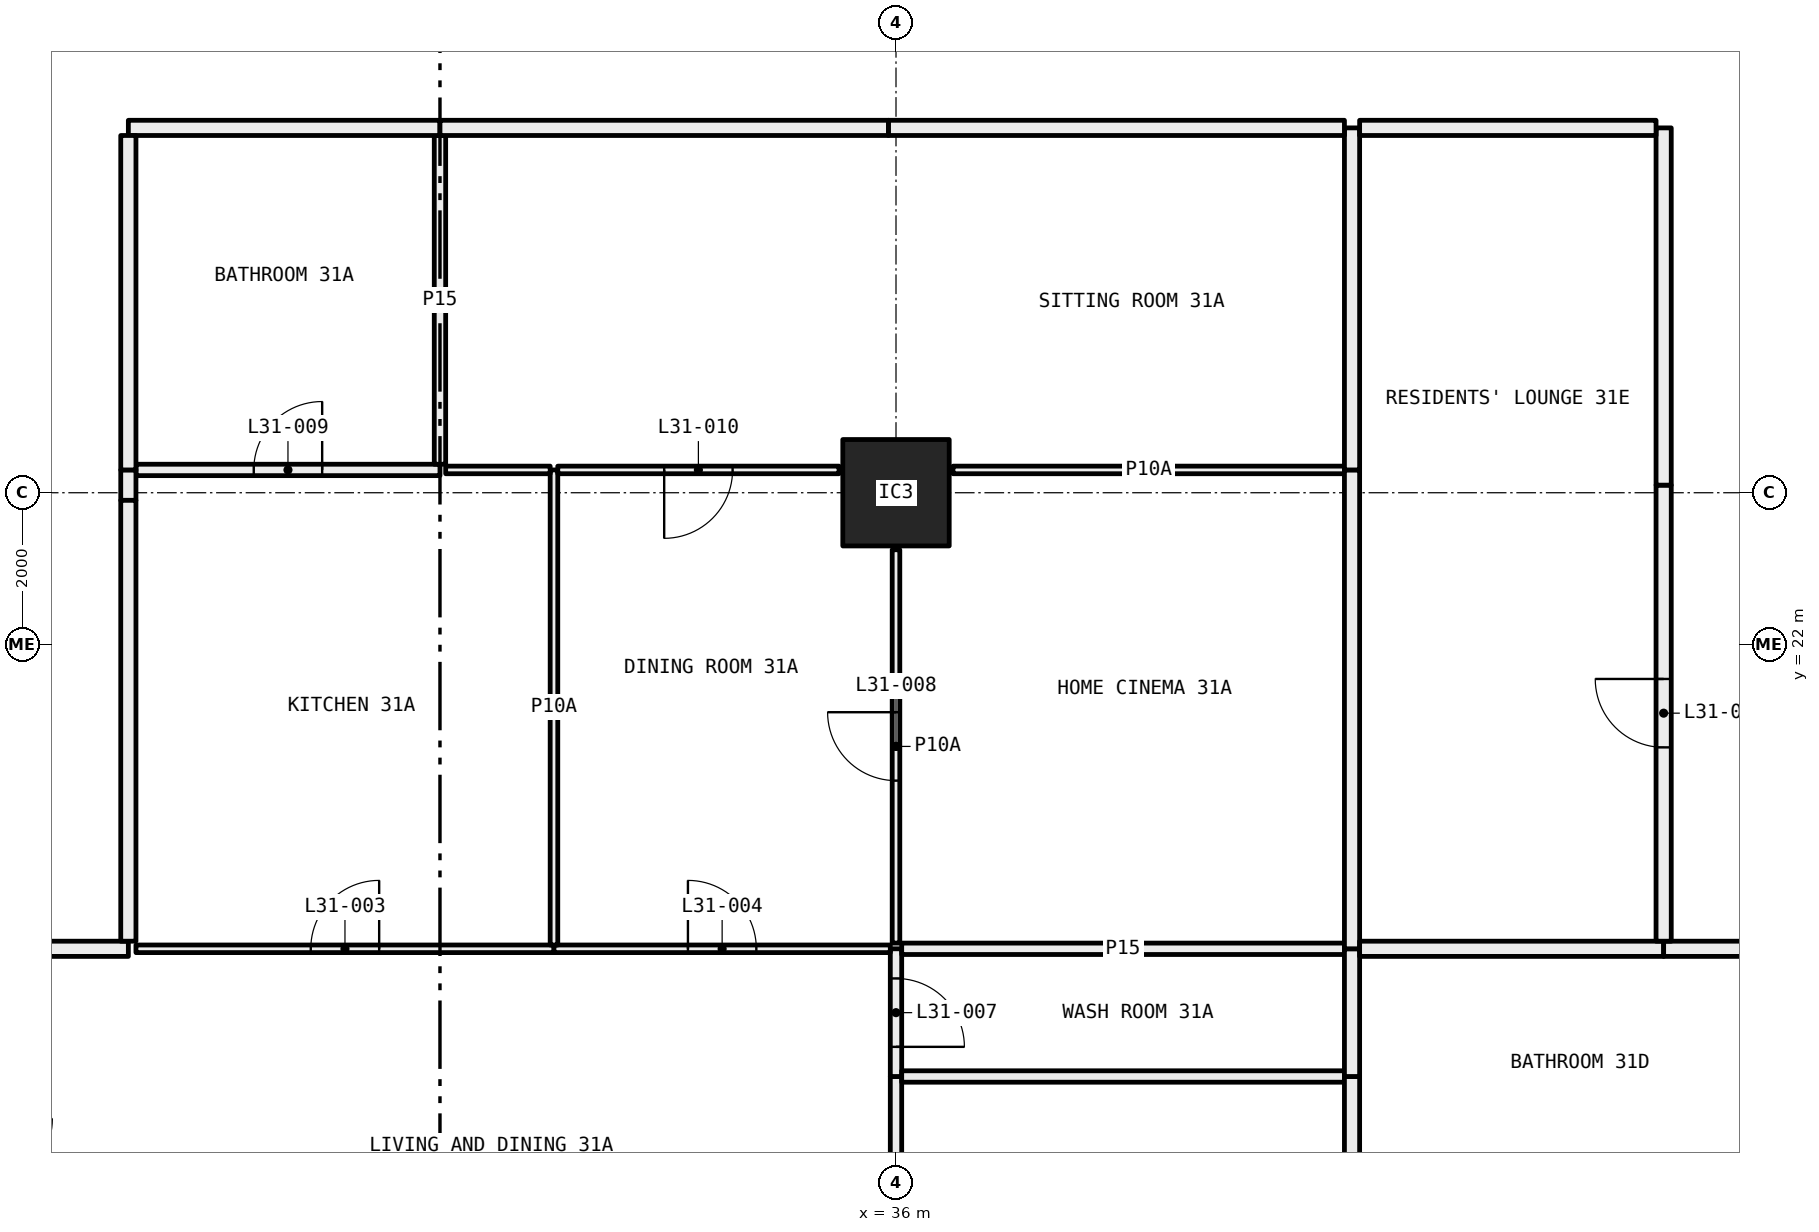
"""IFC4 building model, lengths in metres.
Left out: names, types, materials, properties, quantities, classifications, styles, units other than length and angle.
Written with IfcOpenShell. Run it as: python <this file> out.ifc"""

import sys

from ifc_helpers import new_model, si_unit, direction, frame, frame_2d, origin, origin_2d, place, context, subcontext, project, spatial, rectangle, hollow_rectangle, extrude, element, fill, save


model = new_model("IFC4")
c1 = context("Model", 3, precision=1e-05, world=origin(), true_north=direction((0.0, 1.0)))
c2 = subcontext(c1, "Body", "Model", "MODEL_VIEW")
j1 = project(units=[si_unit("LENGTHUNIT", "METRE"), si_unit("PLANEANGLEUNIT", "RADIAN")], contexts=[c1])
p1 = place(None, origin())
s1 = spatial("IfcSite", under=j1, at=p1, CompositionType="ELEMENT")
p2 = place(p1, origin())
s2 = spatial("IfcBuilding", under=s1, at=p2, CompositionType="ELEMENT")
p3 = place(p2, frame((0.0, 0.0, 120.75)))
s3 = spatial("IfcBuildingStorey", under=s2, at=p3, CompositionType="ELEMENT", Elevation=120.75)
p4 = place(p3, frame((36.0, 24.0, 0.0), z_axis=(0.0, 0.0, 1.0), x_axis=(1.0, 0.0, 0.0)))
e1 = element("IfcColumn", 1, at=p4, inside=s3, PredefinedType="COLUMN", context=c2, shape_type="SweptSolid", body=[
    extrude(hollow_rectangle(XDim=1.4, YDim=1.4, WallThickness=0.06, at=origin_2d()), origin(), (0.0, 0.0, 1.0), 3.05),
])
p5 = place(p3, frame((36.0, 12.72, 0.0), z_axis=(0.0, 0.0, 1.0), x_axis=(0.0, 1.0, 0.0)))
e2 = element("IfcWall", 2, at=p5, inside=s3, PredefinedType="PARTITIONING", context=c2, shape_type="SweptSolid", body=[
    extrude(rectangle(XDim=3.6, YDim=0.15, at=frame_2d((1.8, 0.0))), origin(), (0.0, 0.0, 1.0), 2.45),
])
p6 = place(p5, frame((1.35, 0.0, 0.0)))
e3 = element("IfcOpeningElement", 3, at=p6, cuts=e2, PredefinedType="OPENING", context=c2, shape_type="SweptSolid", body=[
    extrude(rectangle(XDim=0.9, YDim=2.1, at=frame_2d((0.45, 1.05))), frame((0.0, 0.085, 0.0), z_axis=(0.0, -1.0, 0.0), x_axis=(1.0, 0.0, 0.0)), (0.0, 0.0, 1.0), 0.17),
])
p7 = place(p3, frame((36.0, 16.32, 0.0), z_axis=(0.0, 0.0, 1.0), x_axis=(0.0, 1.0, 0.0)))
e4 = element("IfcWall", 4, at=p7, inside=s3, PredefinedType="PARTITIONING", context=c2, shape_type="SweptSolid", body=[
    extrude(rectangle(XDim=1.68, YDim=0.15, at=frame_2d((0.84, 0.0))), origin(), (0.0, 0.0, 1.0), 2.45),
])
p8 = place(p7, frame((0.39, 0.0, 0.0)))
e5 = element("IfcOpeningElement", 5, at=p8, cuts=e4, PredefinedType="OPENING", context=c2, shape_type="SweptSolid", body=[
    extrude(rectangle(XDim=0.9, YDim=2.1, at=frame_2d((0.45, 1.05))), frame((0.0, 0.085, 0.0), z_axis=(0.0, -1.0, 0.0), x_axis=(1.0, 0.0, 0.0)), (0.0, 0.0, 1.0), 0.17),
])
p9 = place(p3, frame((31.5, 18.0, 0.0), z_axis=(0.0, 0.0, 1.0), x_axis=(-1.0, 0.0, 0.0)))
e6 = element("IfcWall", 6, at=p9, inside=s3, PredefinedType="PARTITIONING", context=c2, shape_type="SweptSolid", body=[
    extrude(rectangle(XDim=5.5, YDim=0.1, at=frame_2d((2.75, 0.0))), origin(), (0.0, 0.0, 1.0), 3.05),
])
p10 = place(p9, frame((2.3, 0.0, 0.0)))
e7 = element("IfcOpeningElement", 7, at=p10, cuts=e6, PredefinedType="OPENING", context=c2, shape_type="SweptSolid", body=[
    extrude(rectangle(XDim=0.9, YDim=2.1, at=frame_2d((0.45, 1.05))), frame((0.0, 0.06, 0.0), z_axis=(0.0, -1.0, 0.0), x_axis=(1.0, 0.0, 0.0)), (0.0, 0.0, 1.0), 0.12),
])
p11 = place(p3, frame((35.925, 18.0, 0.0), z_axis=(0.0, 0.0, 1.0), x_axis=(-1.0, 0.0, 0.0)))
e8 = element("IfcWall", 8, at=p11, inside=s3, PredefinedType="PARTITIONING", context=c2, shape_type="SweptSolid", body=[
    extrude(rectangle(XDim=4.425, YDim=0.1, at=frame_2d((2.212, 0.0))), origin(), (0.0, 0.0, 1.0), 2.45),
])
p12 = place(p11, frame((1.762, 0.0, 0.0)))
e9 = element("IfcOpeningElement", 9, at=p12, cuts=e8, PredefinedType="OPENING", context=c2, shape_type="SweptSolid", body=[
    extrude(rectangle(XDim=0.9, YDim=2.1, at=frame_2d((0.45, 1.05))), frame((0.0, 0.06, 0.0), z_axis=(0.0, -1.0, 0.0), x_axis=(1.0, 0.0, 0.0)), (0.0, 0.0, 1.0), 0.12),
])
p13 = place(p3, frame((25.9, 18.0, 0.0), z_axis=(0.0, 0.0, 1.0), x_axis=(-1.0, 0.0, 0.0)))
e10 = element("IfcWall", 10, at=p13, inside=s3, PredefinedType="PARTITIONING", context=c2, shape_type="SweptSolid", body=[
    extrude(rectangle(XDim=1.9, YDim=0.2, at=frame_2d((0.95, 0.0))), origin(), (0.0, 0.0, 1.0), 3.05),
])
p14 = place(p3, frame((41.9, 16.32, 0.0), z_axis=(0.0, 0.0, 1.0), x_axis=(-1.0, 0.0, 0.0)))
e11 = element("IfcWall", 11, at=p14, inside=s3, PredefinedType="PARTITIONING", context=c2, shape_type="SweptSolid", body=[
    extrude(rectangle(XDim=5.825, YDim=0.15, at=frame_2d((2.913, 0.0))), origin(), (0.0, 0.0, 1.0), 2.45),
])
p15 = place(p3, frame((42.0, 15.0, 0.0), z_axis=(0.0, 0.0, 1.0), x_axis=(0.0, 1.0, 0.0)))
e12 = element("IfcWall", 12, at=p15, inside=s3, PredefinedType="PARTITIONING", context=c2, shape_type="SweptSolid", body=[
    extrude(rectangle(XDim=1.32, YDim=0.2, at=frame_2d((0.66, 0.0))), origin(), (0.0, 0.0, 1.0), 3.05),
])
p16 = place(p3, frame((41.9, 18.0, 0.0), z_axis=(0.0, 0.0, 1.0), x_axis=(-1.0, 0.0, 0.0)))
e13 = element("IfcWall", 13, at=p16, inside=s3, PredefinedType="PARTITIONING", context=c2, shape_type="SweptSolid", body=[
    extrude(rectangle(XDim=5.825, YDim=0.15, at=frame_2d((2.913, 0.0))), origin(), (0.0, 0.0, 1.0), 2.45),
])
p17 = place(p3, frame((42.0, 16.32, 0.0), z_axis=(0.0, 0.0, 1.0), x_axis=(0.0, 1.0, 0.0)))
e14 = element("IfcWall", 14, at=p17, inside=s3, PredefinedType="PARTITIONING", context=c2, shape_type="SweptSolid", body=[
    extrude(rectangle(XDim=1.68, YDim=0.2, at=frame_2d((0.84, 0.0))), origin(), (0.0, 0.0, 1.0), 3.05),
])
p18 = place(p3, frame((31.5, 18.05, 0.0), z_axis=(0.0, 0.0, 1.0), x_axis=(0.0, 1.0, 0.0)))
e15 = element("IfcWall", 15, at=p18, inside=s3, PredefinedType="PARTITIONING", context=c2, shape_type="SweptSolid", body=[
    extrude(rectangle(XDim=6.25, YDim=0.1, at=frame_2d((3.125, 0.0))), origin(), (0.0, 0.0, 1.0), 2.45),
])
p19 = place(p3, frame((30.0, 24.3, 0.0), z_axis=(0.0, 0.0, 1.0), x_axis=(-1.0, 0.0, 0.0)))
e16 = element("IfcWall", 16, at=p19, inside=s3, PredefinedType="PARTITIONING", context=c2, shape_type="SweptSolid", body=[
    extrude(rectangle(XDim=4.0, YDim=0.15, at=frame_2d((2.0, 0.0))), origin(), (0.0, 0.0, 1.0), 3.05),
])
p20 = place(p19, frame((1.55, 0.0, 0.0)))
e17 = element("IfcOpeningElement", 17, at=p20, cuts=e16, PredefinedType="OPENING", context=c2, shape_type="SweptSolid", body=[
    extrude(rectangle(XDim=0.9, YDim=2.1, at=frame_2d((0.45, 1.05))), frame((0.0, 0.085, 0.0), z_axis=(0.0, -1.0, 0.0), x_axis=(1.0, 0.0, 0.0)), (0.0, 0.0, 1.0), 0.17),
])
p21 = place(p3, frame((31.45, 24.3, 0.0), z_axis=(0.0, 0.0, 1.0), x_axis=(-1.0, 0.0, 0.0)))
e18 = element("IfcWall", 18, at=p21, inside=s3, PredefinedType="PARTITIONING", context=c2, shape_type="SweptSolid", body=[
    extrude(rectangle(XDim=1.375, YDim=0.1, at=frame_2d((0.688, 0.0))), origin(), (0.0, 0.0, 1.0), 3.05),
])
p22 = place(p3, frame((25.9, 24.3, 0.0), z_axis=(0.0, 0.0, 1.0), x_axis=(0.0, -1.0, 0.0)))
e19 = element("IfcWall", 19, at=p22, inside=s3, PredefinedType="PARTITIONING", context=c2, shape_type="SweptSolid", body=[
    extrude(rectangle(XDim=0.4, YDim=0.2, at=frame_2d((0.2, 0.0))), origin(), (0.0, 0.0, 1.0), 2.45),
])
p23 = place(p3, frame((25.9, 23.9, 0.0), z_axis=(0.0, 0.0, 1.0), x_axis=(0.0, -1.0, 0.0)))
e20 = element("IfcWall", 20, at=p23, inside=s3, PredefinedType="PARTITIONING", context=c2, shape_type="SweptSolid", body=[
    extrude(rectangle(XDim=5.8, YDim=0.2, at=frame_2d((2.9, 0.0))), origin(), (0.0, 0.0, 1.0), 3.05),
])
p24 = place(p3, frame((36.0, 18.075, 0.0), z_axis=(0.0, 0.0, 1.0), x_axis=(0.0, 1.0, 0.0)))
e21 = element("IfcWall", 21, at=p24, inside=s3, PredefinedType="PARTITIONING", context=c2, shape_type="SweptSolid", body=[
    extrude(rectangle(XDim=5.175, YDim=0.1, at=frame_2d((2.587, 0.0))), origin(), (0.0, 0.0, 1.0), 2.45),
])
p25 = place(p24, frame((2.137, 0.0, 0.0)))
e22 = element("IfcOpeningElement", 22, at=p25, cuts=e21, PredefinedType="OPENING", context=c2, shape_type="SweptSolid", body=[
    extrude(rectangle(XDim=0.9, YDim=2.1, at=frame_2d((0.45, 1.05))), frame((0.0, 0.06, 0.0), z_axis=(0.0, -1.0, 0.0), x_axis=(1.0, 0.0, 0.0)), (0.0, 0.0, 1.0), 0.12),
])
p26 = place(p3, frame((35.25, 24.3, 0.0), z_axis=(0.0, 0.0, 1.0), x_axis=(-1.0, 0.0, 0.0)))
e23 = element("IfcWall", 23, at=p26, inside=s3, PredefinedType="PARTITIONING", context=c2, shape_type="SweptSolid", body=[
    extrude(rectangle(XDim=3.7, YDim=0.1, at=frame_2d((1.85, 0.0))), origin(), (0.0, 0.0, 1.0), 3.05),
])
p27 = place(p26, frame((1.4, 0.0, 0.0)))
e24 = element("IfcOpeningElement", 24, at=p27, cuts=e23, PredefinedType="OPENING", context=c2, shape_type="SweptSolid", body=[
    extrude(rectangle(XDim=0.9, YDim=2.1, at=frame_2d((0.45, 1.05))), frame((0.0, 0.06, 0.0), z_axis=(0.0, -1.0, 0.0), x_axis=(1.0, 0.0, 0.0)), (0.0, 0.0, 1.0), 0.12),
])
p28 = place(p3, frame((41.9, 24.3, 0.0), z_axis=(0.0, 0.0, 1.0), x_axis=(-1.0, 0.0, 0.0)))
e25 = element("IfcWall", 25, at=p28, inside=s3, PredefinedType="PARTITIONING", context=c2, shape_type="SweptSolid", body=[
    extrude(rectangle(XDim=5.15, YDim=0.1, at=frame_2d((2.575, 0.0))), origin(), (0.0, 0.0, 1.0), 3.05),
])
p29 = place(p3, frame((42.0, 18.0, 0.0), z_axis=(0.0, 0.0, 1.0), x_axis=(0.0, 1.0, 0.0)))
e26 = element("IfcWall", 26, at=p29, inside=s3, PredefinedType="PARTITIONING", context=c2, shape_type="SweptSolid", body=[
    extrude(rectangle(XDim=6.3, YDim=0.2, at=frame_2d((3.15, 0.0))), origin(), (0.0, 0.0, 1.0), 2.45),
])
p30 = place(p3, frame((30.0, 24.375, 0.0), z_axis=(0.0, 0.0, 1.0), x_axis=(0.0, 1.0, 0.0)))
e27 = element("IfcWall", 27, at=p30, inside=s3, PredefinedType="PARTITIONING", context=c2, shape_type="SweptSolid", body=[
    extrude(rectangle(XDim=4.325, YDim=0.15, at=frame_2d((2.163, 0.0))), origin(), (0.0, 0.0, 1.0), 3.05),
])
p31 = place(p3, frame((30.0, 28.8, 0.0), z_axis=(0.0, 0.0, 1.0), x_axis=(-1.0, 0.0, 0.0)))
e28 = element("IfcWall", 28, at=p31, inside=s3, PredefinedType="PARTITIONING", context=c2, shape_type="SweptSolid", body=[
    extrude(rectangle(XDim=4.1, YDim=0.2, at=frame_2d((2.05, 0.0))), origin(), (0.0, 0.0, 1.0), 3.05),
])
p32 = place(p3, frame((25.9, 28.7, 0.0), z_axis=(0.0, 0.0, 1.0), x_axis=(0.0, -1.0, 0.0)))
e29 = element("IfcWall", 29, at=p32, inside=s3, PredefinedType="PARTITIONING", context=c2, shape_type="SweptSolid", body=[
    extrude(rectangle(XDim=4.4, YDim=0.2, at=frame_2d((2.2, 0.0))), origin(), (0.0, 0.0, 1.0), 3.05),
])
p33 = place(p3, frame((42.0, 24.3, 0.0), z_axis=(0.0, 0.0, 1.0), x_axis=(0.0, 1.0, 0.0)))
e30 = element("IfcWall", 30, at=p33, inside=s3, PredefinedType="PARTITIONING", context=c2, shape_type="SweptSolid", body=[
    extrude(rectangle(XDim=4.5, YDim=0.2, at=frame_2d((2.25, 0.0))), origin(), (0.0, 0.0, 1.0), 3.05),
])
p34 = place(p3, frame((41.9, 28.8, 0.0), z_axis=(0.0, 0.0, 1.0), x_axis=(-1.0, 0.0, 0.0)))
e31 = element("IfcWall", 31, at=p34, inside=s3, PredefinedType="PARTITIONING", context=c2, shape_type="SweptSolid", body=[
    extrude(rectangle(XDim=6.0, YDim=0.2, at=frame_2d((3.0, 0.0))), origin(), (0.0, 0.0, 1.0), 2.45),
])
p35 = place(p3, frame((35.9, 28.8, 0.0), z_axis=(0.0, 0.0, 1.0), x_axis=(-1.0, 0.0, 0.0)))
e32 = element("IfcWall", 32, at=p35, inside=s3, PredefinedType="PARTITIONING", context=c2, shape_type="SweptSolid", body=[
    extrude(rectangle(XDim=5.9, YDim=0.2, at=frame_2d((2.95, 0.0))), origin(), (0.0, 0.0, 1.0), 3.05),
])
p36 = place(p3, frame((46.1, 18.0, 0.0), z_axis=(0.0, 0.0, 1.0), x_axis=(-1.0, 0.0, 0.0)))
e33 = element("IfcWall", 33, at=p36, inside=s3, PredefinedType="PARTITIONING", context=c2, shape_type="SweptSolid", body=[
    extrude(rectangle(XDim=4.0, YDim=0.2, at=frame_2d((2.0, 0.0))), origin(), (0.0, 0.0, 1.0), 3.05),
])
p37 = place(p3, frame((48.0, 18.0, 0.0), z_axis=(0.0, 0.0, 1.0), x_axis=(-1.0, 0.0, 0.0)))
e34 = element("IfcWall", 34, at=p37, inside=s3, PredefinedType="PARTITIONING", context=c2, shape_type="SweptSolid", body=[
    extrude(rectangle(XDim=1.9, YDim=0.2, at=frame_2d((0.95, 0.0))), origin(), (0.0, 0.0, 1.0), 3.05),
])
p38 = place(p3, frame((46.1, 18.1, 0.0), z_axis=(0.0, 0.0, 1.0), x_axis=(0.0, 1.0, 0.0)))
e35 = element("IfcWall", 35, at=p38, inside=s3, PredefinedType="PARTITIONING", context=c2, shape_type="SweptSolid", body=[
    extrude(rectangle(XDim=6.0, YDim=0.2, at=frame_2d((3.0, 0.0))), origin(), (0.0, 0.0, 1.0), 2.45),
])
p39 = place(p38, frame((2.55, 0.0, 0.0)))
e36 = element("IfcOpeningElement", 36, at=p39, cuts=e35, PredefinedType="OPENING", context=c2, shape_type="SweptSolid", body=[
    extrude(rectangle(XDim=0.9, YDim=2.1, at=frame_2d((0.45, 1.05))), frame((0.0, 0.11, 0.0), z_axis=(0.0, -1.0, 0.0), x_axis=(1.0, 0.0, 0.0)), (0.0, 0.0, 1.0), 0.22),
])
p40 = place(p3, frame((46.1, 24.1, 0.0), z_axis=(0.0, 0.0, 1.0), x_axis=(0.0, 1.0, 0.0)))
e37 = element("IfcWall", 37, at=p40, inside=s3, PredefinedType="PARTITIONING", context=c2, shape_type="SweptSolid", body=[
    extrude(rectangle(XDim=4.7, YDim=0.2, at=frame_2d((2.35, 0.0))), origin(), (0.0, 0.0, 1.0), 3.05),
])
p41 = place(p3, frame((46.0, 28.8, 0.0), z_axis=(0.0, 0.0, 1.0), x_axis=(-1.0, 0.0, 0.0)))
e38 = element("IfcWall", 38, at=p41, inside=s3, PredefinedType="PARTITIONING", context=c2, shape_type="SweptSolid", body=[
    extrude(rectangle(XDim=3.9, YDim=0.2, at=frame_2d((1.95, 0.0))), origin(), (0.0, 0.0, 1.0), 3.05),
])
p42 = place(p10, frame((0.9, 0.0, 0.0), x_axis=(-1.0, 0.0, 0.0)))
e39 = element("IfcDoor", 39, at=p42, inside=s3, OperationType="SINGLE_SWING_LEFT", PredefinedType="DOOR", context=c2, shape_type="SweptSolid", body=[
    extrude(rectangle(XDim=0.9, YDim=2.1, at=frame_2d((0.45, 1.05))), frame((0.0, 0.025, 0.0), z_axis=(0.0, -1.0, 0.0), x_axis=(1.0, 0.0, 0.0)), (0.0, 0.0, 1.0), 0.05),
])
fill(e7, e39)
p43 = place(p12, frame((0.9, 0.0, 0.0), x_axis=(-1.0, 0.0, 0.0)))
e40 = element("IfcDoor", 40, at=p43, inside=s3, OperationType="SINGLE_SWING_RIGHT", PredefinedType="DOOR", context=c2, shape_type="SweptSolid", body=[
    extrude(rectangle(XDim=0.9, YDim=2.1, at=frame_2d((0.45, 1.05))), frame((0.0, 0.025, 0.0), z_axis=(0.0, -1.0, 0.0), x_axis=(1.0, 0.0, 0.0)), (0.0, 0.0, 1.0), 0.05),
])
fill(e9, e40)
p44 = place(p8, frame((0.9, 0.0, 0.0), x_axis=(-1.0, 0.0, 0.0)))
e41 = element("IfcDoor", 41, at=p44, inside=s3, OperationType="SINGLE_SWING_LEFT", PredefinedType="DOOR", context=c2, shape_type="SweptSolid", body=[
    extrude(rectangle(XDim=0.9, YDim=2.1, at=frame_2d((0.45, 1.05))), frame((0.0, 0.025, 0.0), z_axis=(0.0, -1.0, 0.0), x_axis=(1.0, 0.0, 0.0)), (0.0, 0.0, 1.0), 0.05),
])
fill(e5, e41)
p45 = place(p25, origin())
e42 = element("IfcDoor", 42, at=p45, inside=s3, OperationType="SINGLE_SWING_LEFT", PredefinedType="DOOR", context=c2, shape_type="SweptSolid", body=[
    extrude(rectangle(XDim=0.9, YDim=2.1, at=frame_2d((0.45, 1.05))), frame((0.0, 0.025, 0.0), z_axis=(0.0, -1.0, 0.0), x_axis=(1.0, 0.0, 0.0)), (0.0, 0.0, 1.0), 0.05),
])
fill(e22, e42)
p46 = place(p20, frame((0.9, 0.0, 0.0), x_axis=(-1.0, 0.0, 0.0)))
e43 = element("IfcDoor", 43, at=p46, inside=s3, OperationType="SINGLE_SWING_LEFT", PredefinedType="DOOR", context=c2, shape_type="SweptSolid", body=[
    extrude(rectangle(XDim=0.9, YDim=2.1, at=frame_2d((0.45, 1.05))), frame((0.0, 0.025, 0.0), z_axis=(0.0, -1.0, 0.0), x_axis=(1.0, 0.0, 0.0)), (0.0, 0.0, 1.0), 0.05),
])
fill(e17, e43)
p47 = place(p27, origin())
e44 = element("IfcDoor", 44, at=p47, inside=s3, OperationType="SINGLE_SWING_LEFT", PredefinedType="DOOR", context=c2, shape_type="SweptSolid", body=[
    extrude(rectangle(XDim=0.9, YDim=2.1, at=frame_2d((0.45, 1.05))), frame((0.0, 0.025, 0.0), z_axis=(0.0, -1.0, 0.0), x_axis=(1.0, 0.0, 0.0)), (0.0, 0.0, 1.0), 0.05),
])
fill(e24, e44)
p48 = place(p39, origin())
e45 = element("IfcDoor", 45, at=p48, inside=s3, OperationType="SINGLE_SWING_LEFT", PredefinedType="DOOR", context=c2, shape_type="SweptSolid", body=[
    extrude(rectangle(XDim=0.9, YDim=2.1, at=frame_2d((0.45, 1.05))), frame((0.0, 0.025, 0.0), z_axis=(0.0, -1.0, 0.0), x_axis=(1.0, 0.0, 0.0)), (0.0, 0.0, 1.0), 0.05),
])
fill(e36, e45)
save(model, sys.argv[1])
